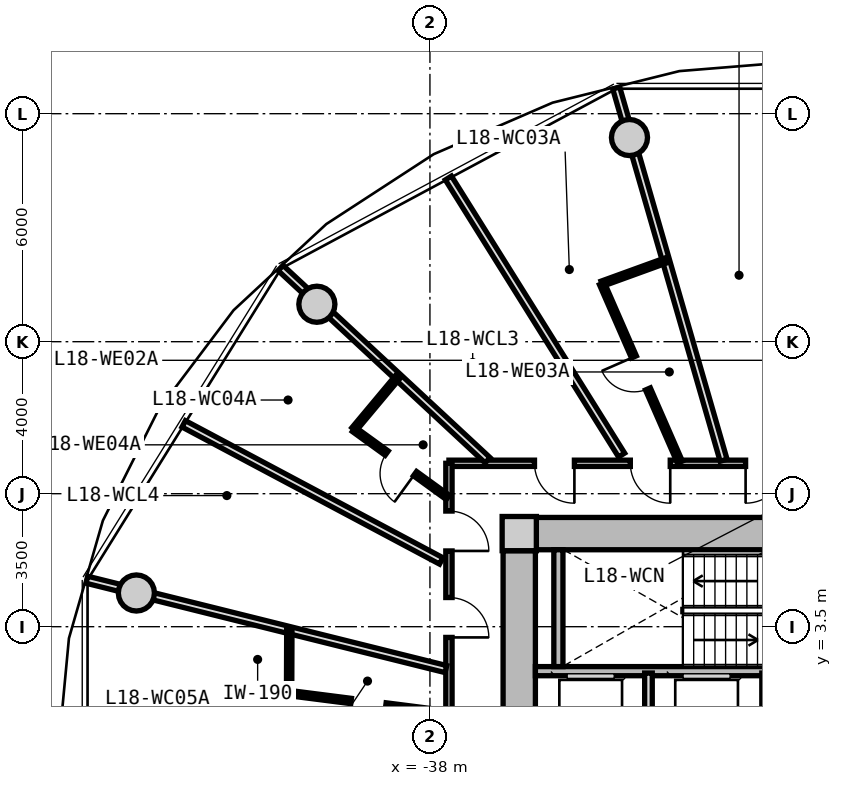
"""IFC4 building model, lengths in metres.
Left out: names, types, materials, properties, quantities, classifications, styles, units other than length and angle.
Written with IfcOpenShell. Run it as: python <this file> out.ifc"""

import sys

from ifc_helpers import new_model, si_unit, direction, frame, frame_2d, origin, origin_2d, place, context, subcontext, project, spatial, rectangle, circle, extrude, source, transform, mapped, element, fill, save


model = new_model("IFC4")
c1 = context("Model", 3, precision=1e-05, world=origin(), true_north=direction((0.0, 1.0)))
c2 = subcontext(c1, "Body", "Model", "MODEL_VIEW")
j1 = project(units=[si_unit("LENGTHUNIT", "METRE"), si_unit("PLANEANGLEUNIT", "RADIAN")], contexts=[c1])
p1 = place(None, origin())
s1 = spatial("IfcSite", under=j1, at=p1, CompositionType="ELEMENT")
p2 = place(p1, origin())
s2 = spatial("IfcBuilding", under=s1, at=p2, CompositionType="ELEMENT")
p3 = place(p2, frame((0.0, 0.0, 61.25)))
s3 = spatial("IfcBuildingStorey", under=s2, at=p3, CompositionType="ELEMENT", Elevation=61.25)
m1 = source(origin(), c2, "Body", "SweptSolid", [
    extrude(rectangle(XDim=0.9, YDim=0.9, at=origin_2d()), origin(), (0.0, 0.0, 1.0), 3.05),
])
p4 = place(p3, frame((-35.65, 5.95, 0.0), z_axis=(0.0, 0.0, 1.0), x_axis=(1.0, 0.0, 0.0)))
e1 = element("IfcColumn", 1, at=p4, inside=s3, PredefinedType="COLUMN", context=c2, shape_type="MappedRepresentation", body=[
    mapped(m1, transform((0.0, 0.0, 0.0), x_axis=(1.0, 0.0, 0.0), y_axis=(0.0, 1.0, 0.0), z_axis=(0.0, 0.0, 1.0), scale=1.0)),
])
m2 = source(origin(), c2, "Body", "SweptSolid", [
    extrude(rectangle(XDim=14.4, YDim=0.85, at=frame_2d((7.2, 0.0))), origin(), (0.0, 0.0, 1.0), 2.79),
])
p5 = place(p3, frame((-35.2, 5.95, 0.0), z_axis=(0.0, 0.0, 1.0), x_axis=(1.0, 0.0, 0.0)))
e2 = element("IfcWall", 2, at=p5, inside=s3, PredefinedType="SHEAR", context=c2, shape_type="MappedRepresentation", body=[
    mapped(m2, transform((0.0, 0.0, 0.0), x_axis=(1.0, 0.0, 0.0), y_axis=(0.0, 1.0, 0.0), z_axis=(0.0, 0.0, 1.0), scale=1.0)),
])
m3 = source(origin(), c2, "Body", "SweptSolid", [
    extrude(rectangle(XDim=11.0, YDim=0.85, at=frame_2d((5.5, 0.0))), origin(), (0.0, 0.0, 1.0), 2.79),
])
p6 = place(p3, frame((-35.65, -5.5, 0.0), z_axis=(0.0, 0.0, 1.0), x_axis=(0.0, 1.0, 0.0)))
e3 = element("IfcWall", 3, at=p6, inside=s3, PredefinedType="SHEAR", context=c2, shape_type="MappedRepresentation", body=[
    mapped(m3, transform((0.0, 0.0, 0.0), x_axis=(1.0, 0.0, 0.0), y_axis=(0.0, 1.0, 0.0), z_axis=(0.0, 0.0, 1.0), scale=1.0)),
])
p7 = place(p6, frame((3.8, 0.0, 0.0)))
e4 = element("IfcOpeningElement", 4, at=p7, cuts=e3, PredefinedType="OPENING", context=c2, shape_type="SweptSolid", body=[
    extrude(rectangle(XDim=1.2, YDim=2.15, at=frame_2d((0.6, 1.075))), frame((0.0, 0.435, 0.0), z_axis=(0.0, -1.0, 0.0), x_axis=(1.0, 0.0, 0.0)), (0.0, 0.0, 1.0), 0.87),
])
m4 = source(origin(), c2, "Body", "SweptSolid", [
    extrude(circle(Radius=0.475, at=origin_2d()), origin(), (0.0, 0.0, 1.0), 3.05),
])
for number, where, z_axis, x_axis in (
    (5, (-32.749, 16.373, 0.0), (0.0, 0.0, 1.0), (1.0, 0.0, 0.0)),
    (6, (-40.975, 11.985, 0.0), (0.0, 0.0, 1.0), (1.0, 0.0, 0.0)),
    (7, (-45.725, 4.387, 0.0), (0.0, 0.0, 1.0), (1.0, 0.0, 0.0)),
):
    element("IfcColumn", number, at=place(p3, frame(where, z_axis=z_axis, x_axis=x_axis)), inside=s3, PredefinedType="COLUMN", context=c2, shape_type="MappedRepresentation", body=[
        mapped(m4, transform((0.0, 0.0, 0.0), x_axis=(1.0, 0.0, 0.0), y_axis=(0.0, 1.0, 0.0), z_axis=(0.0, 0.0, 1.0), scale=1.0)),
    ])
m5 = source(origin(), c2, "Body", "SweptSolid", [
    extrude(rectangle(XDim=7.765, YDim=0.24, at=frame_2d((3.883, 0.0))), origin(), (0.0, 0.0, 1.0), 2.79),
])
p8 = place(p3, frame((-35.225, 2.33, 0.0), z_axis=(0.0, 0.0, 1.0), x_axis=(1.0, 0.0, 0.0)))
e8 = element("IfcWall", 8, at=p8, inside=s3, PredefinedType="PARTITIONING", context=c2, shape_type="MappedRepresentation", body=[
    mapped(m5, transform((0.0, 0.0, 0.0), x_axis=(1.0, 0.0, 0.0), y_axis=(0.0, 1.0, 0.0), z_axis=(0.0, 0.0, 1.0), scale=1.0)),
])
m6 = source(origin(), c2, "Body", "SweptSolid", [
    extrude(rectangle(XDim=3.075, YDim=0.24, at=frame_2d((1.538, 0.0))), origin(), (0.0, 0.0, 1.0), 2.79),
])
p9 = place(p3, frame((-34.62, 2.45, 0.0), z_axis=(0.0, 0.0, 1.0), x_axis=(0.0, 1.0, 0.0)))
e9 = element("IfcWall", 9, at=p9, inside=s3, PredefinedType="PARTITIONING", context=c2, shape_type="MappedRepresentation", body=[
    mapped(m6, transform((0.0, 0.0, 0.0), x_axis=(1.0, 0.0, 0.0), y_axis=(0.0, 1.0, 0.0), z_axis=(0.0, 0.0, 1.0), scale=1.0)),
])
m7 = source(origin(), c2, "Body", "SweptSolid", [
    extrude(rectangle(XDim=2.33, YDim=0.2, at=frame_2d((1.165, 0.0))), origin(), (0.0, 0.0, 1.0), 2.775),
])
p10 = place(p3, frame((-32.25, -0.05, 0.0), z_axis=(0.0, 0.0, 1.0), x_axis=(0.0, 1.0, 0.0)))
e10 = element("IfcWall", 10, at=p10, inside=s3, PredefinedType="PARTITIONING", context=c2, shape_type="MappedRepresentation", body=[
    mapped(m7, transform((0.0, 0.0, 0.0), x_axis=(1.0, 0.0, 0.0), y_axis=(0.0, 1.0, 0.0), z_axis=(0.0, 0.0, 1.0), scale=1.0)),
])
m8 = source(origin(), c2, "Body", "SweptSolid", [
    extrude(rectangle(XDim=19.0, YDim=0.165, at=frame_2d((9.5, 0.0))), origin(), (0.0, 0.0, 1.0), 2.775),
])
p11 = place(p3, frame((-37.5, 7.8, 0.0), z_axis=(0.0, 0.0, 1.0), x_axis=(1.0, 0.0, 0.0)))
e11 = element("IfcWall", 11, at=p11, inside=s3, PredefinedType="PARTITIONING", context=c2, shape_type="MappedRepresentation", body=[
    mapped(m8, transform((0.0, 0.0, 0.0), x_axis=(1.0, 0.0, 0.0), y_axis=(0.0, 1.0, 0.0), z_axis=(0.0, 0.0, 1.0), scale=1.0)),
])
p12 = place(p11, frame((14.653, 0.0, 0.0)))
e12 = element("IfcOpeningElement", 12, at=p12, cuts=e11, PredefinedType="OPENING", context=c2, shape_type="SweptSolid", body=[
    extrude(rectangle(XDim=1.05, YDim=2.15, at=frame_2d((0.525, 1.075))), frame((0.0, 0.093, 0.0), z_axis=(0.0, -1.0, 0.0), x_axis=(1.0, 0.0, 0.0)), (0.0, 0.0, 1.0), 0.185),
])
p13 = place(p11, frame((12.5, 0.0, 0.0)))
e13 = element("IfcOpeningElement", 13, at=p13, cuts=e11, PredefinedType="OPENING", context=c2, shape_type="SweptSolid", body=[
    extrude(rectangle(XDim=1.05, YDim=2.15, at=frame_2d((0.525, 1.075))), frame((0.0, 0.093, 0.0), z_axis=(0.0, -1.0, 0.0), x_axis=(1.0, 0.0, 0.0)), (0.0, 0.0, 1.0), 0.185),
])
p14 = place(p11, frame((9.352, 0.0, 0.0)))
e14 = element("IfcOpeningElement", 14, at=p14, cuts=e11, PredefinedType="OPENING", context=c2, shape_type="SweptSolid", body=[
    extrude(rectangle(XDim=1.05, YDim=2.15, at=frame_2d((0.525, 1.075))), frame((0.0, 0.093, 0.0), z_axis=(0.0, -1.0, 0.0), x_axis=(1.0, 0.0, 0.0)), (0.0, 0.0, 1.0), 0.185),
])
p15 = place(p11, frame((7.806, 0.0, 0.0)))
e15 = element("IfcOpeningElement", 15, at=p15, cuts=e11, PredefinedType="OPENING", context=c2, shape_type="SweptSolid", body=[
    extrude(rectangle(XDim=1.05, YDim=2.15, at=frame_2d((0.525, 1.075))), frame((0.0, 0.093, 0.0), z_axis=(0.0, -1.0, 0.0), x_axis=(1.0, 0.0, 0.0)), (0.0, 0.0, 1.0), 0.185),
])
p16 = place(p11, frame((4.773, 0.0, 0.0)))
e16 = element("IfcOpeningElement", 16, at=p16, cuts=e11, PredefinedType="OPENING", context=c2, shape_type="SweptSolid", body=[
    extrude(rectangle(XDim=1.05, YDim=2.15, at=frame_2d((0.525, 1.075))), frame((0.0, 0.093, 0.0), z_axis=(0.0, -1.0, 0.0), x_axis=(1.0, 0.0, 0.0)), (0.0, 0.0, 1.0), 0.185),
])
p17 = place(p11, frame((2.251, 0.0, 0.0)))
e17 = element("IfcOpeningElement", 17, at=p17, cuts=e11, PredefinedType="OPENING", context=c2, shape_type="SweptSolid", body=[
    extrude(rectangle(XDim=1.05, YDim=2.15, at=frame_2d((0.525, 1.075))), frame((0.0, 0.093, 0.0), z_axis=(0.0, -1.0, 0.0), x_axis=(1.0, 0.0, 0.0)), (0.0, 0.0, 1.0), 0.185),
])
m9 = source(origin(), c2, "Body", "SweptSolid", [
    extrude(rectangle(XDim=15.6, YDim=0.165, at=frame_2d((7.8, 0.0))), origin(), (0.0, 0.0, 1.0), 2.775),
])
p18 = place(p3, frame((-37.5, -7.8, 0.0), z_axis=(0.0, 0.0, 1.0), x_axis=(0.0, 1.0, 0.0)))
e18 = element("IfcWall", 18, at=p18, inside=s3, PredefinedType="PARTITIONING", context=c2, shape_type="MappedRepresentation", body=[
    mapped(m9, transform((0.0, 0.0, 0.0), x_axis=(1.0, 0.0, 0.0), y_axis=(0.0, 1.0, 0.0), z_axis=(0.0, 0.0, 1.0), scale=1.0)),
])
p19 = place(p18, frame((7.812, 0.0, 0.0)))
e19 = element("IfcOpeningElement", 19, at=p19, cuts=e18, PredefinedType="OPENING", context=c2, shape_type="SweptSolid", body=[
    extrude(rectangle(XDim=1.05, YDim=2.15, at=frame_2d((0.525, 1.075))), frame((0.0, 0.093, 0.0), z_axis=(0.0, -1.0, 0.0), x_axis=(1.0, 0.0, 0.0)), (0.0, 0.0, 1.0), 0.185),
])
p20 = place(p18, frame((6.035, 0.0, 0.0)))
e20 = element("IfcOpeningElement", 20, at=p20, cuts=e18, PredefinedType="OPENING", context=c2, shape_type="SweptSolid", body=[
    extrude(rectangle(XDim=1.05, YDim=2.15, at=frame_2d((0.525, 1.075))), frame((0.0, 0.093, 0.0), z_axis=(0.0, -1.0, 0.0), x_axis=(1.0, 0.0, 0.0)), (0.0, 0.0, 1.0), 0.185),
])
p21 = place(p18, frame((2.826, 0.0, 0.0)))
e21 = element("IfcOpeningElement", 21, at=p21, cuts=e18, PredefinedType="OPENING", context=c2, shape_type="SweptSolid", body=[
    extrude(rectangle(XDim=1.05, YDim=2.15, at=frame_2d((0.525, 1.075))), frame((0.0, 0.093, 0.0), z_axis=(0.0, -1.0, 0.0), x_axis=(1.0, 0.0, 0.0)), (0.0, 0.0, 1.0), 0.185),
])
p22 = place(p18, frame((0.881, 0.0, 0.0)))
e22 = element("IfcOpeningElement", 22, at=p22, cuts=e18, PredefinedType="OPENING", context=c2, shape_type="SweptSolid", body=[
    extrude(rectangle(XDim=1.05, YDim=2.15, at=frame_2d((0.525, 1.075))), frame((0.0, 0.093, 0.0), z_axis=(0.0, -1.0, 0.0), x_axis=(1.0, 0.0, 0.0)), (0.0, 0.0, 1.0), 0.185),
])
p23 = place(p18, frame((13.293, 0.0, 0.0)))
e23 = element("IfcOpeningElement", 23, at=p23, cuts=e18, PredefinedType="OPENING", context=c2, shape_type="SweptSolid", body=[
    extrude(rectangle(XDim=1.05, YDim=2.15, at=frame_2d((0.525, 1.075))), frame((0.0, 0.093, 0.0), z_axis=(0.0, -1.0, 0.0), x_axis=(1.0, 0.0, 0.0)), (0.0, 0.0, 1.0), 0.185),
])
p24 = place(p18, frame((11.018, 0.0, 0.0)))
e24 = element("IfcOpeningElement", 24, at=p24, cuts=e18, PredefinedType="OPENING", context=c2, shape_type="SweptSolid", body=[
    extrude(rectangle(XDim=1.05, YDim=2.15, at=frame_2d((0.525, 1.075))), frame((0.0, 0.093, 0.0), z_axis=(0.0, -1.0, 0.0), x_axis=(1.0, 0.0, 0.0)), (0.0, 0.0, 1.0), 0.185),
])
m10 = source(origin(), c2, "Body", "SweptSolid", [
    extrude(rectangle(XDim=9.737, YDim=0.19, at=frame_2d((4.869, 0.0))), origin(), (0.0, 0.0, 1.0), 2.225),
])
p25 = place(p3, frame((-37.58, 2.385, 0.0), z_axis=(0.0, 0.0, 1.0), x_axis=(-0.970392716238, 0.241532557375, 0.0)))
e25 = element("IfcWall", 25, at=p25, inside=s3, PredefinedType="PARTITIONING", context=c2, shape_type="MappedRepresentation", body=[
    mapped(m10, transform((0.0, 0.0, 0.0), x_axis=(1.0, 0.0, 0.0), y_axis=(0.0, 1.0, 0.0), z_axis=(0.0, 0.0, 1.0), scale=1.0)),
])
m11 = source(origin(), c2, "Body", "SweptSolid", [
    extrude(rectangle(XDim=4.21, YDim=0.14, at=frame_2d((2.105, 0.0))), origin(), (0.0, 0.0, 1.0), 2.775),
])
p26 = place(p3, frame((-37.53, 1.219, 0.0), z_axis=(0.0, 0.0, 1.0), x_axis=(-0.991917821325, 0.126881975625, 0.0)))
e26 = element("IfcWall", 26, at=p26, inside=s3, PredefinedType="PARTITIONING", context=c2, shape_type="MappedRepresentation", body=[
    mapped(m11, transform((0.0, 0.0, 0.0), x_axis=(1.0, 0.0, 0.0), y_axis=(0.0, 1.0, 0.0), z_axis=(0.0, 0.0, 1.0), scale=1.0)),
])
p27 = place(p26, frame((1.645, 0.0, 0.0)))
e27 = element("IfcOpeningElement", 27, at=p27, cuts=e26, PredefinedType="OPENING", context=c2, shape_type="SweptSolid", body=[
    extrude(rectangle(XDim=0.92, YDim=2.1, at=frame_2d((0.46, 1.05))), frame((0.0, 0.08, 0.0), z_axis=(0.0, -1.0, 0.0), x_axis=(1.0, 0.0, 0.0)), (0.0, 0.0, 1.0), 0.16),
])
m12 = source(origin(), c2, "Body", "SweptSolid", [
    extrude(rectangle(XDim=1.675, YDim=0.14, at=frame_2d((0.837, 0.0))), origin(), (0.0, 0.0, 1.0), 2.775),
])
p28 = place(p3, frame((-41.706, 1.753, 0.0), z_axis=(0.0, 0.0, 1.0), x_axis=(0.003644821977, 0.999993357614, 0.0)))
e28 = element("IfcWall", 28, at=p28, inside=s3, PredefinedType="PARTITIONING", context=c2, shape_type="MappedRepresentation", body=[
    mapped(m12, transform((0.0, 0.0, 0.0), x_axis=(1.0, 0.0, 0.0), y_axis=(0.0, 1.0, 0.0), z_axis=(0.0, 0.0, 1.0), scale=1.0)),
])
m13 = source(origin(), c2, "Body", "SweptSolid", [
    extrude(rectangle(XDim=10.196, YDim=0.19, at=frame_2d((5.098, 0.0))), origin(), (0.0, 0.0, 1.0), 2.225),
])
p29 = place(p3, frame((-30.273, 7.88, 0.0), z_axis=(0.0, 0.0, 1.0), x_axis=(-0.277136420347, 0.960830580549, 0.0)))
e29 = element("IfcWall", 29, at=p29, inside=s3, PredefinedType="PARTITIONING", context=c2, shape_type="MappedRepresentation", body=[
    mapped(m13, transform((0.0, 0.0, 0.0), x_axis=(1.0, 0.0, 0.0), y_axis=(0.0, 1.0, 0.0), z_axis=(0.0, 0.0, 1.0), scale=1.0)),
])
m14 = source(origin(), c2, "Body", "SweptSolid", [
    extrude(rectangle(XDim=7.435, YDim=0.19, at=frame_2d((3.717, 0.0))), origin(), (0.0, 0.0, 1.0), 2.225),
])
p30 = place(p3, frame((-36.483, 7.88, 0.0), z_axis=(0.0, 0.0, 1.0), x_axis=(-0.732651956848, 0.680603489652, 0.0)))
e30 = element("IfcWall", 30, at=p30, inside=s3, PredefinedType="PARTITIONING", context=c2, shape_type="MappedRepresentation", body=[
    mapped(m14, transform((0.0, 0.0, 0.0), x_axis=(1.0, 0.0, 0.0), y_axis=(0.0, 1.0, 0.0), z_axis=(0.0, 0.0, 1.0), scale=1.0)),
])
m15 = source(origin(), c2, "Body", "SweptSolid", [
    extrude(rectangle(XDim=8.598, YDim=0.19, at=frame_2d((4.299, 0.0))), origin(), (0.0, 0.0, 1.0), 2.775),
])
p31 = place(p3, frame((-32.957, 8.017, 0.0), z_axis=(0.0, 0.0, 1.0), x_axis=(-0.530039776395, 0.847972779893, 0.0)))
e31 = element("IfcWall", 31, at=p31, inside=s3, PredefinedType="PARTITIONING", context=c2, shape_type="MappedRepresentation", body=[
    mapped(m15, transform((0.0, 0.0, 0.0), x_axis=(1.0, 0.0, 0.0), y_axis=(0.0, 1.0, 0.0), z_axis=(0.0, 0.0, 1.0), scale=1.0)),
])
m16 = source(origin(), c2, "Body", "SweptSolid", [
    extrude(rectangle(XDim=5.126, YDim=0.14, at=frame_2d((2.563, 0.0))), origin(), (0.0, 0.0, 1.0), 2.775),
])
p32 = place(p3, frame((-31.422, 7.83, 0.0), z_axis=(0.0, 0.0, 1.0), x_axis=(-0.400473994842, 0.916308124735, 0.0)))
e32 = element("IfcWall", 32, at=p32, inside=s3, PredefinedType="PARTITIONING", context=c2, shape_type="MappedRepresentation", body=[
    mapped(m16, transform((0.0, 0.0, 0.0), x_axis=(1.0, 0.0, 0.0), y_axis=(0.0, 1.0, 0.0), z_axis=(0.0, 0.0, 1.0), scale=1.0)),
])
p33 = place(p32, frame((2.103, 0.0, 0.0)))
e33 = element("IfcOpeningElement", 33, at=p33, cuts=e32, PredefinedType="OPENING", context=c2, shape_type="SweptSolid", body=[
    extrude(rectangle(XDim=0.92, YDim=2.1, at=frame_2d((0.46, 1.05))), frame((0.0, 0.08, 0.0), z_axis=(0.0, -1.0, 0.0), x_axis=(1.0, 0.0, 0.0)), (0.0, 0.0, 1.0), 0.16),
])
m17 = source(origin(), c2, "Body", "SweptSolid", [
    extrude(rectangle(XDim=1.811, YDim=0.14, at=frame_2d((0.906, 0.0))), origin(), (0.0, 0.0, 1.0), 2.775),
])
p34 = place(p3, frame((-33.475, 12.527, 0.0), z_axis=(0.0, 0.0, 1.0), x_axis=(0.940009682452, 0.341147764021, 0.0)))
e34 = element("IfcWall", 34, at=p34, inside=s3, PredefinedType="PARTITIONING", context=c2, shape_type="MappedRepresentation", body=[
    mapped(m17, transform((0.0, 0.0, 0.0), x_axis=(1.0, 0.0, 0.0), y_axis=(0.0, 1.0, 0.0), z_axis=(0.0, 0.0, 1.0), scale=1.0)),
])
m18 = source(origin(), c2, "Body", "SweptSolid", [
    extrude(rectangle(XDim=7.677, YDim=0.19, at=frame_2d((3.838, 0.0))), origin(), (0.0, 0.0, 1.0), 2.775),
])
p35 = place(p3, frame((-37.703, 5.231, 0.0), z_axis=(0.0, 0.0, 1.0), x_axis=(-0.882725057546, 0.469889851753, 0.0)))
e35 = element("IfcWall", 35, at=p35, inside=s3, PredefinedType="PARTITIONING", context=c2, shape_type="MappedRepresentation", body=[
    mapped(m18, transform((0.0, 0.0, 0.0), x_axis=(1.0, 0.0, 0.0), y_axis=(0.0, 1.0, 0.0), z_axis=(0.0, 0.0, 1.0), scale=1.0)),
])
m19 = source(origin(), c2, "Body", "SweptSolid", [
    extrude(rectangle(XDim=3.051, YDim=0.14, at=frame_2d((1.525, 0.0))), origin(), (0.0, 0.0, 1.0), 2.775),
])
p36 = place(p3, frame((-37.53, 6.903, 0.0), z_axis=(0.0, 0.0, 1.0), x_axis=(-0.809849031404, 0.586638343729, 0.0)))
e36 = element("IfcWall", 36, at=p36, inside=s3, PredefinedType="PARTITIONING", context=c2, shape_type="MappedRepresentation", body=[
    mapped(m19, transform((0.0, 0.0, 0.0), x_axis=(1.0, 0.0, 0.0), y_axis=(0.0, 1.0, 0.0), z_axis=(0.0, 0.0, 1.0), scale=1.0)),
])
p37 = place(p36, frame((1.065, 0.0, 0.0)))
e37 = element("IfcOpeningElement", 37, at=p37, cuts=e36, PredefinedType="OPENING", context=c2, shape_type="SweptSolid", body=[
    extrude(rectangle(XDim=0.92, YDim=2.1, at=frame_2d((0.46, 1.05))), frame((0.0, 0.08, 0.0), z_axis=(0.0, -1.0, 0.0), x_axis=(1.0, 0.0, 0.0)), (0.0, 0.0, 1.0), 0.16),
])
m20 = source(origin(), c2, "Body", "SweptSolid", [
    extrude(rectangle(XDim=1.84, YDim=0.14, at=frame_2d((0.92, 0.0))), origin(), (0.0, 0.0, 1.0), 2.415),
])
p38 = place(p3, frame((-40.0, 8.692, 0.0), z_axis=(0.0, 0.0, 1.0), x_axis=(0.641410397049, 0.767197955262, 0.0)))
e38 = element("IfcWall", 38, at=p38, inside=s3, PredefinedType="PARTITIONING", context=c2, shape_type="MappedRepresentation", body=[
    mapped(m20, transform((0.0, 0.0, 0.0), x_axis=(1.0, 0.0, 0.0), y_axis=(0.0, 1.0, 0.0), z_axis=(0.0, 0.0, 1.0), scale=1.0)),
])
m21 = source(origin(), c2, "Body", "SweptSolid", [
    extrude(rectangle(XDim=0.92, YDim=2.1, at=frame_2d((0.46, 1.05))), frame((0.0, 0.025, 0.0), z_axis=(0.0, -1.0, 0.0), x_axis=(1.0, 0.0, 0.0)), (0.0, 0.0, 1.0), 0.05),
])
p39 = place(p27, origin())
e39 = element("IfcDoor", 39, at=p39, inside=s3, OperationType="SINGLE_SWING_RIGHT", PredefinedType="DOOR", context=c2, shape_type="MappedRepresentation", body=[
    mapped(m21, transform((0.0, 0.0, 0.0), x_axis=(1.0, 0.0, 0.0), y_axis=(0.0, 1.0, 0.0), z_axis=(0.0, 0.0, 1.0), scale=1.0)),
])
fill(e27, e39)
m22 = source(origin(), c2, "Body", "SweptSolid", [
    extrude(rectangle(XDim=1.05, YDim=2.15, at=frame_2d((0.525, 1.075))), frame((0.0, 0.025, 0.0), z_axis=(0.0, -1.0, 0.0), x_axis=(1.0, 0.0, 0.0)), (0.0, 0.0, 1.0), 0.05),
])
p40 = place(p15, frame((1.05, 0.0, 0.0), z_axis=(0.0, 0.0, 1.0), x_axis=(-1.0, 0.0, 0.0)))
e40 = element("IfcDoor", 40, at=p40, inside=s3, OperationType="SINGLE_SWING_RIGHT", PredefinedType="DOOR", context=c2, shape_type="MappedRepresentation", body=[
    mapped(m22, transform((0.0, 0.0, 0.0), x_axis=(1.0, 0.0, 0.0), y_axis=(0.0, 1.0, 0.0), z_axis=(0.0, 0.0, 1.0), scale=1.0)),
])
fill(e15, e40)
p41 = place(p16, frame((1.05, 0.0, 0.0), z_axis=(0.0, 0.0, 1.0), x_axis=(-1.0, 0.0, 0.0)))
e41 = element("IfcDoor", 41, at=p41, inside=s3, OperationType="SINGLE_SWING_LEFT", PredefinedType="DOOR", context=c2, shape_type="MappedRepresentation", body=[
    mapped(m22, transform((0.0, 0.0, 0.0), x_axis=(1.0, 0.0, 0.0), y_axis=(0.0, 1.0, 0.0), z_axis=(0.0, 0.0, 1.0), scale=1.0)),
])
fill(e16, e41)
p42 = place(p33, origin())
e42 = element("IfcDoor", 42, at=p42, inside=s3, OperationType="SINGLE_SWING_RIGHT", PredefinedType="DOOR", context=c2, shape_type="MappedRepresentation", body=[
    mapped(m21, transform((0.0, 0.0, 0.0), x_axis=(1.0, 0.0, 0.0), y_axis=(0.0, 1.0, 0.0), z_axis=(0.0, 0.0, 1.0), scale=1.0)),
])
fill(e33, e42)
p43 = place(p17, frame((1.05, 0.0, 0.0), z_axis=(0.0, 0.0, 1.0), x_axis=(-1.0, 0.0, 0.0)))
e43 = element("IfcDoor", 43, at=p43, inside=s3, OperationType="SINGLE_SWING_LEFT", PredefinedType="DOOR", context=c2, shape_type="MappedRepresentation", body=[
    mapped(m22, transform((0.0, 0.0, 0.0), x_axis=(1.0, 0.0, 0.0), y_axis=(0.0, 1.0, 0.0), z_axis=(0.0, 0.0, 1.0), scale=1.0)),
])
fill(e17, e43)
p44 = place(p23, frame((1.05, 0.0, 0.0), z_axis=(0.0, 0.0, 1.0), x_axis=(-1.0, 0.0, 0.0)))
e44 = element("IfcDoor", 44, at=p44, inside=s3, OperationType="SINGLE_SWING_RIGHT", PredefinedType="DOOR", context=c2, shape_type="MappedRepresentation", body=[
    mapped(m22, transform((0.0, 0.0, 0.0), x_axis=(1.0, 0.0, 0.0), y_axis=(0.0, 1.0, 0.0), z_axis=(0.0, 0.0, 1.0), scale=1.0)),
])
fill(e23, e44)
p45 = place(p37, origin())
e45 = element("IfcDoor", 45, at=p45, inside=s3, OperationType="SINGLE_SWING_LEFT", PredefinedType="DOOR", context=c2, shape_type="MappedRepresentation", body=[
    mapped(m21, transform((0.0, 0.0, 0.0), x_axis=(1.0, 0.0, 0.0), y_axis=(0.0, 1.0, 0.0), z_axis=(0.0, 0.0, 1.0), scale=1.0)),
])
fill(e37, e45)
p46 = place(p24, frame((1.05, 0.0, 0.0), z_axis=(0.0, 0.0, 1.0), x_axis=(-1.0, 0.0, 0.0)))
e46 = element("IfcDoor", 46, at=p46, inside=s3, OperationType="SINGLE_SWING_RIGHT", PredefinedType="DOOR", context=c2, shape_type="MappedRepresentation", body=[
    mapped(m22, transform((0.0, 0.0, 0.0), x_axis=(1.0, 0.0, 0.0), y_axis=(0.0, 1.0, 0.0), z_axis=(0.0, 0.0, 1.0), scale=1.0)),
])
fill(e24, e46)
save(model, sys.argv[1])
